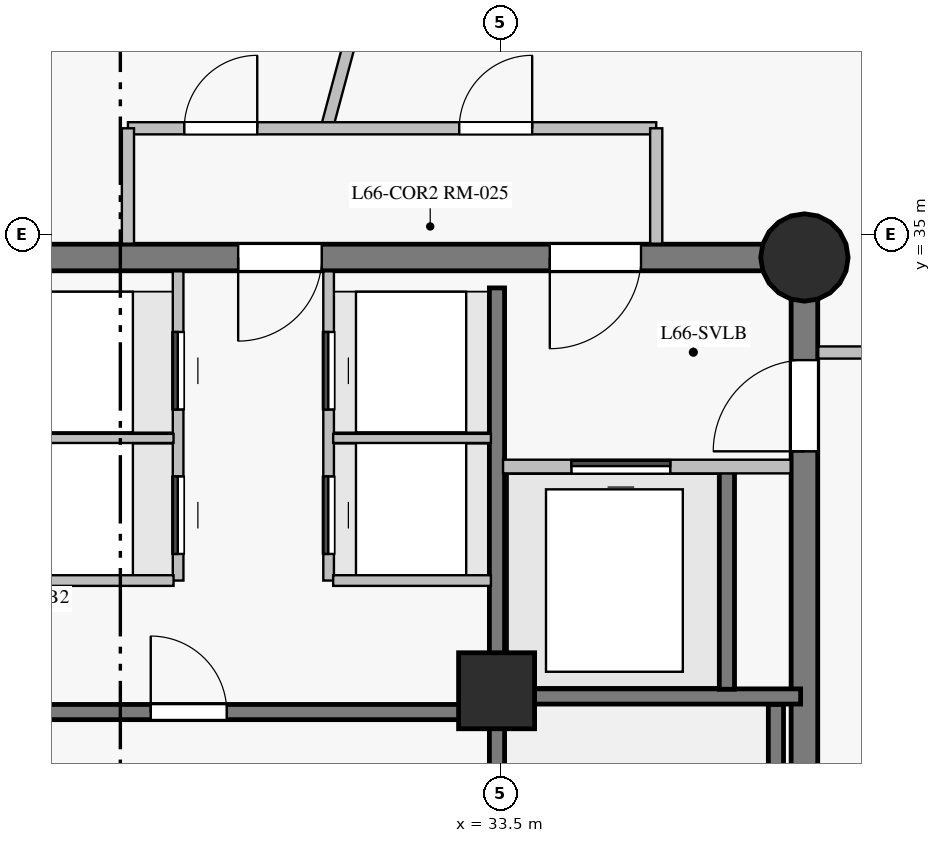
"""IFC4 building model, lengths in metres.
Left out: names, types, materials, properties, quantities, classifications, styles, units other than length and angle.
Written with IfcOpenShell. Run it as: python <this file> out.ifc"""

import sys

from ifc_helpers import new_model, si_unit, direction, frame, frame_2d, origin, origin_with_axes, origin_2d, place, context, subcontext, project, spatial, rectangle, circle, extrude, source, transform, mapped, element, fill, save


model = new_model("IFC4")
c1 = context("Model", 3, precision=1e-05, world=origin(), true_north=direction((0.0, 1.0)))
c2 = subcontext(c1, "Body", "Model", "MODEL_VIEW")
j1 = project(units=[si_unit("LENGTHUNIT", "METRE"), si_unit("PLANEANGLEUNIT", "RADIAN")], contexts=[c1])
p1 = place(None, origin())
s1 = spatial("IfcSite", under=j1, at=p1, CompositionType="ELEMENT")
p2 = place(p1, origin())
s2 = spatial("IfcBuilding", under=s1, at=p2, CompositionType="ELEMENT")
p3 = place(p2, frame((0.0, 0.0, 226.05)))
s3 = spatial("IfcBuildingStorey", under=s2, at=p3, CompositionType="ELEMENT", Elevation=226.05)
p4 = place(p3, frame((37.5, 18.3, 0.0), z_axis=(0.0, 0.0, 1.0), x_axis=(0.0, 1.0, 0.0)))
e1 = element("IfcWall", 1, at=p4, inside=s3, PredefinedType="SHEAR", context=c2, shape_type="SweptSolid", body=[
    extrude(rectangle(XDim=16.4, YDim=0.35, at=frame_2d((8.2, 0.0))), origin(), (0.0, 0.0, 1.0), 2.85),
])
p5 = place(p4, frame((13.85, 0.0, 0.0)))
e2 = element("IfcOpeningElement", 2, at=p5, cuts=e1, PredefinedType="OPENING", context=c2, shape_type="SweptSolid", body=[
    extrude(rectangle(XDim=1.2, YDim=2.15, at=frame_2d((0.6, 1.075))), frame((0.0, 0.185, 0.0), z_axis=(0.0, -1.0, 0.0), x_axis=(1.0, 0.0, 0.0)), (0.0, 0.0, 1.0), 0.37),
])
p6 = place(p3, frame((37.5, 34.7, 0.0), z_axis=(0.0, 0.0, 1.0), x_axis=(-1.0, 0.0, 0.0)))
e3 = element("IfcWall", 3, at=p6, inside=s3, PredefinedType="SHEAR", context=c2, shape_type="SweptSolid", body=[
    extrude(rectangle(XDim=10.95, YDim=0.35, at=frame_2d((5.475, 0.0))), origin(), (0.0, 0.0, 1.0), 2.85),
])
p7 = place(p6, frame((2.15, 0.0, 0.0)))
e4 = element("IfcOpeningElement", 4, at=p7, cuts=e3, PredefinedType="OPENING", context=c2, shape_type="SweptSolid", body=[
    extrude(rectangle(XDim=1.2, YDim=2.15, at=frame_2d((0.6, 1.075))), frame((0.0, 0.185, 0.0), z_axis=(0.0, -1.0, 0.0), x_axis=(1.0, 0.0, 0.0)), (0.0, 0.0, 1.0), 0.37),
])
p8 = place(p6, frame((6.35, 0.0, 0.0)))
e5 = element("IfcOpeningElement", 5, at=p8, cuts=e3, PredefinedType="OPENING", context=c2, shape_type="SweptSolid", body=[
    extrude(rectangle(XDim=1.1, YDim=2.15, at=frame_2d((0.55, 1.075))), frame((0.0, 0.185, 0.0), z_axis=(0.0, -1.0, 0.0), x_axis=(1.0, 0.0, 0.0)), (0.0, 0.0, 1.0), 0.37),
])
m1 = source(origin_with_axes(), c2, "Body", "SweptSolid", [
    extrude(circle(Radius=0.575, at=origin_2d()), origin(), (0.0, 0.0, 1.0), 3.05),
])
p9 = place(p3, frame((37.5, 34.7, 0.0), z_axis=(0.0, 0.0, 1.0), x_axis=(1.0, 0.0, 0.0)))
e6 = element("IfcColumn", 6, at=p9, inside=s3, PredefinedType="COLUMN", context=c2, shape_type="MappedRepresentation", body=[
    mapped(m1, transform((0.0, 0.0, 0.0), scale=1.0)),
])
m2 = source(origin_with_axes(), c2, "Body", "SweptSolid", [
    extrude(rectangle(XDim=1.0, YDim=1.0, at=origin_2d()), origin(), (0.0, 0.0, 1.0), 3.05),
])
p10 = place(p3, frame((33.45, 29.0, 0.0), z_axis=(0.0, 0.0, 1.0), x_axis=(1.0, 0.0, 0.0)))
e7 = element("IfcColumn", 7, at=p10, inside=s3, PredefinedType="COLUMN", context=c2, shape_type="MappedRepresentation", body=[
    mapped(m2, transform((0.0, 0.0, 0.0), scale=1.0)),
])
p11 = place(p3, frame((33.455, 18.7, 0.0), z_axis=(0.0, 0.0, 1.0), x_axis=(0.0, 1.0, 0.0)))
e8 = element("IfcWall", 8, at=p11, inside=s3, PredefinedType="SHEAR", context=c2, shape_type="SweptSolid", body=[
    extrude(rectangle(XDim=15.6, YDim=0.2, at=frame_2d((7.8, 0.0))), origin(), (0.0, 0.0, 1.0), 2.85),
])
p12 = place(p11, frame((2.75, 0.0, 0.0)))
e9 = element("IfcOpeningElement", 9, at=p12, cuts=e8, PredefinedType="OPENING", context=c2, shape_type="SweptSolid", body=[
    extrude(rectangle(XDim=1.15, YDim=2.15, at=frame_2d((0.575, 1.075))), frame((0.0, 0.11, 0.0), z_axis=(0.0, -1.0, 0.0), x_axis=(1.0, 0.0, 0.0)), (0.0, 0.0, 1.0), 0.22),
])
p13 = place(p11, frame((0.55, 0.0, 0.0)))
e10 = element("IfcOpeningElement", 10, at=p13, cuts=e8, PredefinedType="OPENING", context=c2, shape_type="SweptSolid", body=[
    extrude(rectangle(XDim=0.94, YDim=2.1, at=frame_2d((0.47, 1.05))), frame((0.0, 0.11, 0.0), z_axis=(0.0, -1.0, 0.0), x_axis=(1.0, 0.0, 0.0)), (0.0, 0.0, 1.0), 0.22),
])
p14 = place(p3, frame((23.7, 28.72, 0.0), z_axis=(0.0, 0.0, 1.0), x_axis=(1.0, 0.0, 0.0)))
e11 = element("IfcWall", 11, at=p14, inside=s3, PredefinedType="SHEAR", context=c2, shape_type="SweptSolid", body=[
    extrude(rectangle(XDim=9.6, YDim=0.2, at=frame_2d((4.8, 0.0))), origin(), (0.0, 0.0, 1.0), 2.85),
])
p15 = place(p14, frame((1.1, 0.0, 0.0)))
e12 = element("IfcOpeningElement", 12, at=p15, cuts=e11, PredefinedType="OPENING", context=c2, shape_type="SweptSolid", body=[
    extrude(rectangle(XDim=0.92, YDim=2.1, at=frame_2d((0.46, 1.05))), frame((0.0, 0.11, 0.0), z_axis=(0.0, -1.0, 0.0), x_axis=(1.0, 0.0, 0.0)), (0.0, 0.0, 1.0), 0.22),
])
p16 = place(p14, frame((5.2, 0.0, 0.0)))
e13 = element("IfcOpeningElement", 13, at=p16, cuts=e11, PredefinedType="OPENING", context=c2, shape_type="SweptSolid", body=[
    extrude(rectangle(XDim=1.0, YDim=2.15, at=frame_2d((0.5, 1.075))), frame((0.0, 0.11, 0.0), z_axis=(0.0, -1.0, 0.0), x_axis=(1.0, 0.0, 0.0)), (0.0, 0.0, 1.0), 0.22),
])
p17 = place(p3, frame((37.125, 21.32, 0.0), z_axis=(0.0, 0.0, 1.0), x_axis=(0.0, 1.0, 0.0)))
e14 = element("IfcWall", 14, at=p17, inside=s3, PredefinedType="SHEAR", context=c2, shape_type="SweptSolid", body=[
    extrude(rectangle(XDim=7.5, YDim=0.2, at=frame_2d((3.75, 0.0))), origin(), (0.0, 0.0, 1.0), 2.85),
])
p18 = place(p3, frame((33.455, 28.925, 0.0), z_axis=(0.0, 0.0, 1.0), x_axis=(1.0, 0.0, 0.0)))
e15 = element("IfcWall", 15, at=p18, inside=s3, PredefinedType="SHEAR", context=c2, shape_type="SweptSolid", body=[
    extrude(rectangle(XDim=3.995, YDim=0.2, at=frame_2d((1.998, 0.0))), origin(), (0.0, 0.0, 1.0), 2.85),
])
p19 = place(p3, frame((36.48, 29.02, 0.0), z_axis=(0.0, 0.0, 1.0), x_axis=(0.0, 1.0, 0.0)))
e16 = element("IfcWall", 16, at=p19, inside=s3, PredefinedType="SHEAR", context=c2, shape_type="SweptSolid", body=[
    extrude(rectangle(XDim=2.86, YDim=0.2, at=frame_2d((1.43, 0.0))), origin(), (0.0, 0.0, 1.0), 2.85),
])
p20 = place(p3, frame((31.207, 36.371, 0.0), z_axis=(0.0, 0.0, 1.0), x_axis=(0.258815277627, 0.965926835773, 0.0)))
e17 = element("IfcWall", 17, at=p20, inside=s3, PredefinedType="PARTITIONING", context=c2, shape_type="SweptSolid", body=[
    extrude(rectangle(XDim=11.455, YDim=0.16, at=frame_2d((5.727, 0.0))), origin(), (0.0, 0.0, 1.0), 2.85),
])
p21 = place(p3, frame((28.6, 36.4, 0.0), z_axis=(0.0, 0.0, 1.0), x_axis=(1.0, 0.0, 0.0)))
e18 = element("IfcWall", 18, at=p21, inside=s3, PredefinedType="PARTITIONING", context=c2, shape_type="SweptSolid", body=[
    extrude(rectangle(XDim=6.95, YDim=0.16, at=frame_2d((3.475, 0.0))), origin(), (0.0, 0.0, 1.0), 2.45),
])
p22 = place(p21, frame((4.358, 0.0, 0.0)))
e19 = element("IfcOpeningElement", 19, at=p22, cuts=e18, PredefinedType="OPENING", context=c2, shape_type="SweptSolid", body=[
    extrude(rectangle(XDim=0.96, YDim=2.15, at=frame_2d((0.48, 1.075))), frame((0.0, 0.09, 0.0), z_axis=(0.0, -1.0, 0.0), x_axis=(1.0, 0.0, 0.0)), (0.0, 0.0, 1.0), 0.18),
])
p23 = place(p21, frame((0.741, 0.0, 0.0)))
e20 = element("IfcOpeningElement", 20, at=p23, cuts=e18, PredefinedType="OPENING", context=c2, shape_type="SweptSolid", body=[
    extrude(rectangle(XDim=0.96, YDim=2.15, at=frame_2d((0.48, 1.075))), frame((0.0, 0.09, 0.0), z_axis=(0.0, -1.0, 0.0), x_axis=(1.0, 0.0, 0.0)), (0.0, 0.0, 1.0), 0.18),
])
p24 = place(p3, frame((37.682, 33.45, 0.0), z_axis=(0.0, 0.0, 1.0), x_axis=(1.0, 0.0, 0.0)))
e21 = element("IfcWall", 21, at=p24, inside=s3, PredefinedType="PARTITIONING", context=c2, shape_type="SweptSolid", body=[
    extrude(rectangle(XDim=4.118, YDim=0.16, at=frame_2d((2.059, 0.0))), origin(), (0.0, 0.0, 1.0), 2.85),
])
p25 = place(p3, frame((29.26, 30.45, 0.0), z_axis=(0.0, 0.0, 1.0), x_axis=(0.0, 1.0, 0.0)))
e22 = element("IfcWall", 22, at=p25, inside=s3, PredefinedType="PARTITIONING", context=c2, shape_type="SweptSolid", body=[
    extrude(rectangle(XDim=4.068, YDim=0.14, at=frame_2d((2.034, 0.0))), origin(), (0.0, 0.0, 1.0), 2.85),
])
p26 = place(p25, frame((0.35, 0.0, 0.0)))
e23 = element("IfcOpeningElement", 23, at=p26, cuts=e22, PredefinedType="OPENING", context=c2, shape_type="SweptSolid", body=[
    extrude(rectangle(XDim=1.02, YDim=2.15, at=frame_2d((0.51, 1.075))), frame((0.0, 0.08, 0.0), z_axis=(0.0, -1.0, 0.0), x_axis=(1.0, 0.0, 0.0)), (0.0, 0.0, 1.0), 0.16),
])
p27 = place(p25, frame((2.25, 0.0, 0.0)))
e24 = element("IfcOpeningElement", 24, at=p27, cuts=e22, PredefinedType="OPENING", context=c2, shape_type="SweptSolid", body=[
    extrude(rectangle(XDim=1.02, YDim=2.15, at=frame_2d((0.51, 1.075))), frame((0.0, 0.08, 0.0), z_axis=(0.0, -1.0, 0.0), x_axis=(1.0, 0.0, 0.0)), (0.0, 0.0, 1.0), 0.16),
])
p28 = place(p3, frame((31.24, 30.45, 0.0), z_axis=(0.0, 0.0, 1.0), x_axis=(0.0, 1.0, 0.0)))
e25 = element("IfcWall", 25, at=p28, inside=s3, PredefinedType="PARTITIONING", context=c2, shape_type="SweptSolid", body=[
    extrude(rectangle(XDim=4.068, YDim=0.14, at=frame_2d((2.034, 0.0))), origin(), (0.0, 0.0, 1.0), 2.85),
])
p29 = place(p28, frame((0.35, 0.0, 0.0)))
e26 = element("IfcOpeningElement", 26, at=p29, cuts=e25, PredefinedType="OPENING", context=c2, shape_type="SweptSolid", body=[
    extrude(rectangle(XDim=1.02, YDim=2.15, at=frame_2d((0.51, 1.075))), frame((0.0, 0.08, 0.0), z_axis=(0.0, -1.0, 0.0), x_axis=(1.0, 0.0, 0.0)), (0.0, 0.0, 1.0), 0.16),
])
p30 = place(p28, frame((2.25, 0.0, 0.0)))
e27 = element("IfcOpeningElement", 27, at=p30, cuts=e25, PredefinedType="OPENING", context=c2, shape_type="SweptSolid", body=[
    extrude(rectangle(XDim=1.02, YDim=2.15, at=frame_2d((0.51, 1.075))), frame((0.0, 0.08, 0.0), z_axis=(0.0, -1.0, 0.0), x_axis=(1.0, 0.0, 0.0)), (0.0, 0.0, 1.0), 0.16),
])
p31 = place(p3, frame((33.535, 31.95, 0.0), z_axis=(0.0, 0.0, 1.0), x_axis=(1.0, 0.0, 0.0)))
e28 = element("IfcWall", 28, at=p31, inside=s3, PredefinedType="PARTITIONING", context=c2, shape_type="SweptSolid", body=[
    extrude(rectangle(XDim=3.784, YDim=0.18, at=frame_2d((1.892, 0.0))), origin(), (0.0, 0.0, 1.0), 2.85),
])
p32 = place(p31, frame((0.9, 0.0, 0.0)))
e29 = element("IfcOpeningElement", 29, at=p32, cuts=e28, PredefinedType="OPENING", context=c2, shape_type="SweptSolid", body=[
    extrude(rectangle(XDim=1.3, YDim=2.2, at=frame_2d((0.65, 1.1))), frame((0.0, 0.1, 0.0), z_axis=(0.0, -1.0, 0.0), x_axis=(1.0, 0.0, 0.0)), (0.0, 0.0, 1.0), 0.2),
])
p33 = place(p3, frame((26.62, 30.45, 0.0), z_axis=(0.0, 0.0, 1.0), x_axis=(1.0, 0.0, 0.0)))
e30 = element("IfcWall", 30, at=p33, inside=s3, PredefinedType="PARTITIONING", context=c2, shape_type="SweptSolid", body=[
    extrude(rectangle(XDim=2.58, YDim=0.14, at=frame_2d((1.29, 0.0))), origin(), (0.0, 0.0, 1.0), 2.85),
])
p34 = place(p3, frame((26.62, 32.32, 0.0), z_axis=(0.0, 0.0, 1.0), x_axis=(1.0, 0.0, 0.0)))
e31 = element("IfcWall", 31, at=p34, inside=s3, PredefinedType="PARTITIONING", context=c2, shape_type="SweptSolid", body=[
    extrude(rectangle(XDim=2.58, YDim=0.12, at=frame_2d((1.29, 0.0))), origin(), (0.0, 0.0, 1.0), 2.85),
])
p35 = place(p3, frame((31.3, 30.45, 0.0), z_axis=(0.0, 0.0, 1.0), x_axis=(1.0, 0.0, 0.0)))
e32 = element("IfcWall", 32, at=p35, inside=s3, PredefinedType="PARTITIONING", context=c2, shape_type="SweptSolid", body=[
    extrude(rectangle(XDim=2.075, YDim=0.14, at=frame_2d((1.038, 0.0))), origin(), (0.0, 0.0, 1.0), 2.85),
])
p36 = place(p3, frame((31.3, 32.32, 0.0), z_axis=(0.0, 0.0, 1.0), x_axis=(1.0, 0.0, 0.0)))
e33 = element("IfcWall", 33, at=p36, inside=s3, PredefinedType="PARTITIONING", context=c2, shape_type="SweptSolid", body=[
    extrude(rectangle(XDim=2.075, YDim=0.12, at=frame_2d((1.038, 0.0))), origin(), (0.0, 0.0, 1.0), 2.85),
])
for number, where, z_axis, x_axis in (
    (34, (28.6, 34.882, 0.0), (0.0, 0.0, 1.0), (0.0, 1.0, 0.0)),
    (35, (35.55, 36.4, 0.0), (0.0, 0.0, 1.0), (0.0, -1.0, 0.0)),
):
    element("IfcWall", number, at=place(p3, frame(where, z_axis=z_axis, x_axis=x_axis)), inside=s3, PredefinedType="PARTITIONING", context=c2, shape_type="SweptSolid", body=[
        extrude(rectangle(XDim=1.518, YDim=0.16, at=frame_2d((0.759, 0.0))), origin(), (0.0, 0.0, 1.0), 2.85),
    ])
m3 = source(origin_with_axes(), c2, "Body", "SweptSolid", [
    extrude(rectangle(XDim=1.2, YDim=2.15, at=frame_2d((0.6, 1.075))), frame((0.0, 0.025, 0.0), z_axis=(0.0, -1.0, 0.0), x_axis=(1.0, 0.0, 0.0)), (0.0, 0.0, 1.0), 0.05),
])
p37 = place(p5, origin())
e36 = element("IfcDoor", 36, at=p37, inside=s3, OperationType="SINGLE_SWING_LEFT", PredefinedType="DOOR", context=c2, shape_type="MappedRepresentation", body=[
    mapped(m3, transform((0.0, 0.0, 0.0), scale=1.0)),
])
fill(e2, e36)
p38 = place(p7, origin())
e37 = element("IfcDoor", 37, at=p38, inside=s3, OperationType="SINGLE_SWING_RIGHT", PredefinedType="DOOR", context=c2, shape_type="MappedRepresentation", body=[
    mapped(m3, transform((0.0, 0.0, 0.0), scale=1.0)),
])
fill(e4, e37)
m4 = source(origin_with_axes(), c2, "Body", "SweptSolid", [
    extrude(rectangle(XDim=1.3, YDim=2.2, at=frame_2d((0.65, 1.1))), frame((0.0, 0.025, 0.0), z_axis=(0.0, -1.0, 0.0), x_axis=(1.0, 0.0, 0.0)), (0.0, 0.0, 1.0), 0.05),
])
p39 = place(p32, origin())
e38 = element("IfcDoor", 38, at=p39, inside=s3, OperationType="SLIDING_TO_LEFT", PredefinedType="DOOR", context=c2, shape_type="MappedRepresentation", body=[
    mapped(m4, transform((0.0, 0.0, 0.0), scale=1.0)),
])
fill(e29, e38)
m5 = source(origin_with_axes(), c2, "Body", "SweptSolid", [
    extrude(rectangle(XDim=1.0, YDim=2.15, at=frame_2d((0.5, 1.075))), frame((0.0, 0.025, 0.0), z_axis=(0.0, -1.0, 0.0), x_axis=(1.0, 0.0, 0.0)), (0.0, 0.0, 1.0), 0.05),
])
p40 = place(p16, origin())
e39 = element("IfcDoor", 39, at=p40, inside=s3, OperationType="SINGLE_SWING_LEFT", PredefinedType="DOOR", context=c2, shape_type="MappedRepresentation", body=[
    mapped(m5, transform((0.0, 0.0, 0.0), scale=1.0)),
])
fill(e13, e39)
m6 = source(origin_with_axes(), c2, "Body", "SweptSolid", [
    extrude(rectangle(XDim=1.1, YDim=2.15, at=frame_2d((0.55, 1.075))), frame((0.0, 0.025, 0.0), z_axis=(0.0, -1.0, 0.0), x_axis=(1.0, 0.0, 0.0)), (0.0, 0.0, 1.0), 0.05),
])
p41 = place(p8, origin())
e40 = element("IfcDoor", 40, at=p41, inside=s3, OperationType="SINGLE_SWING_RIGHT", PredefinedType="DOOR", context=c2, shape_type="MappedRepresentation", body=[
    mapped(m6, transform((0.0, 0.0, 0.0), scale=1.0)),
])
fill(e5, e40)
m7 = source(origin_with_axes(), c2, "Body", "SweptSolid", [
    extrude(rectangle(XDim=1.02, YDim=2.15, at=frame_2d((0.51, 1.075))), frame((0.0, 0.025, 0.0), z_axis=(0.0, -1.0, 0.0), x_axis=(1.0, 0.0, 0.0)), (0.0, 0.0, 1.0), 0.05),
])
p42 = place(p26, origin())
e41 = element("IfcDoor", 41, at=p42, inside=s3, OperationType="SLIDING_TO_LEFT", PredefinedType="DOOR", context=c2, shape_type="MappedRepresentation", body=[
    mapped(m7, transform((0.0, 0.0, 0.0), scale=1.0)),
])
fill(e23, e41)
p43 = place(p27, origin())
e42 = element("IfcDoor", 42, at=p43, inside=s3, OperationType="SLIDING_TO_LEFT", PredefinedType="DOOR", context=c2, shape_type="MappedRepresentation", body=[
    mapped(m7, transform((0.0, 0.0, 0.0), scale=1.0)),
])
fill(e24, e42)
p44 = place(p29, origin())
e43 = element("IfcDoor", 43, at=p44, inside=s3, OperationType="SLIDING_TO_LEFT", PredefinedType="DOOR", context=c2, shape_type="MappedRepresentation", body=[
    mapped(m7, transform((0.0, 0.0, 0.0), scale=1.0)),
])
fill(e26, e43)
p45 = place(p30, origin())
e44 = element("IfcDoor", 44, at=p45, inside=s3, OperationType="SLIDING_TO_LEFT", PredefinedType="DOOR", context=c2, shape_type="MappedRepresentation", body=[
    mapped(m7, transform((0.0, 0.0, 0.0), scale=1.0)),
])
fill(e27, e44)
m8 = source(origin_with_axes(), c2, "Body", "SweptSolid", [
    extrude(rectangle(XDim=0.96, YDim=2.15, at=frame_2d((0.48, 1.075))), frame((0.0, 0.025, 0.0), z_axis=(0.0, -1.0, 0.0), x_axis=(1.0, 0.0, 0.0)), (0.0, 0.0, 1.0), 0.05),
])
p46 = place(p22, origin())
e45 = element("IfcDoor", 45, at=p46, inside=s3, OperationType="SINGLE_SWING_RIGHT", PredefinedType="DOOR", context=c2, shape_type="MappedRepresentation", body=[
    mapped(m8, transform((0.0, 0.0, 0.0), scale=1.0)),
])
fill(e19, e45)
p47 = place(p23, origin())
e46 = element("IfcDoor", 46, at=p47, inside=s3, OperationType="SINGLE_SWING_RIGHT", PredefinedType="DOOR", context=c2, shape_type="MappedRepresentation", body=[
    mapped(m8, transform((0.0, 0.0, 0.0), scale=1.0)),
])
fill(e20, e46)
save(model, sys.argv[1])
